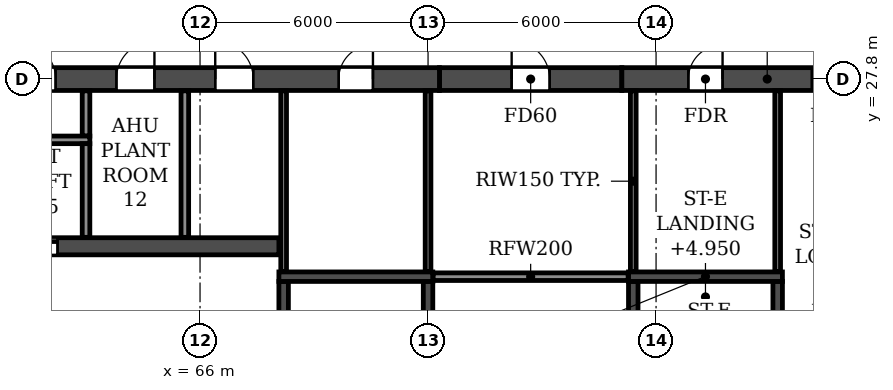
"""IFC4 building model, lengths in metres.
Left out: names, types, materials, properties, quantities, classifications, styles, units other than length and angle.
Written with IfcOpenShell. Run it as: python <this file> out.ifc"""

import sys

from ifc_helpers import new_model, si_unit, direction, frame, frame_2d, origin, place, context, subcontext, project, spatial, rectangle, extrude, element, fill, save


model = new_model("IFC4")
c1 = context("Model", 3, precision=1e-05, world=origin(), true_north=direction((0.0, 1.0)))
c2 = subcontext(c1, "Body", "Model", "MODEL_VIEW")
j1 = project(units=[si_unit("LENGTHUNIT", "METRE"), si_unit("PLANEANGLEUNIT", "RADIAN")], contexts=[c1])
p1 = place(None, origin())
s1 = spatial("IfcSite", under=j1, at=p1, CompositionType="ELEMENT")
p2 = place(p1, origin())
s2 = spatial("IfcBuilding", under=s1, at=p2, CompositionType="ELEMENT")
p3 = place(p2, frame((0.0, 0.0, 165.3)))
s3 = spatial("IfcBuildingStorey", under=s2, at=p3, CompositionType="ELEMENT", Elevation=165.3)
p4 = place(p3, frame((72.3, 27.8, 0.0), z_axis=(0.0, 0.0, 1.0), x_axis=(1.0, 0.0, 0.0)))
e1 = element("IfcWall", 1, at=p4, inside=s3, PredefinedType="SHEAR", context=c2, shape_type="SweptSolid", body=[
    extrude(rectangle(XDim=4.8, YDim=0.6, at=frame_2d((2.4, 0.0))), origin(), (0.0, 0.0, 1.0), 6.38),
])
p5 = place(p4, frame((1.9, 0.0, 0.0)))
e2 = element("IfcOpeningElement", 2, at=p5, cuts=e1, PredefinedType="OPENING", context=c2, shape_type="SweptSolid", body=[
    extrude(rectangle(XDim=1.0, YDim=2.1, at=frame_2d((0.5, 1.05))), frame((0.0, 0.31, 0.0), z_axis=(0.0, -1.0, 0.0), x_axis=(1.0, 0.0, 0.0)), (0.0, 0.0, 1.0), 0.62),
])
p6 = place(p3, frame((29.7, 27.8, 0.0), z_axis=(0.0, 0.0, 1.0), x_axis=(1.0, 0.0, 0.0)))
e3 = element("IfcWall", 3, at=p6, inside=s3, PredefinedType="SOLIDWALL", context=c2, shape_type="SweptSolid", body=[
    extrude(rectangle(XDim=42.6, YDim=0.6, at=frame_2d((21.3, 0.0))), origin(), (0.0, 0.0, 1.0), 6.38),
])
p7 = place(p6, frame((1.75, 0.0, 0.0)))
e4 = element("IfcOpeningElement", 4, at=p7, cuts=e3, PredefinedType="OPENING", context=c2, shape_type="SweptSolid", body=[
    extrude(rectangle(XDim=0.9, YDim=2.1, at=frame_2d((0.45, 1.05))), frame((0.0, 0.31, 0.0), z_axis=(0.0, -1.0, 0.0), x_axis=(1.0, 0.0, 0.0)), (0.0, 0.0, 1.0), 0.62),
])
p8 = place(p6, frame((4.9, 0.0, 0.0)))
e5 = element("IfcOpeningElement", 5, at=p8, cuts=e3, PredefinedType="OPENING", context=c2, shape_type="SweptSolid", body=[
    extrude(rectangle(XDim=1.0, YDim=2.1, at=frame_2d((0.5, 1.05))), frame((0.0, 0.31, 0.0), z_axis=(0.0, -1.0, 0.0), x_axis=(1.0, 0.0, 0.0)), (0.0, 0.0, 1.0), 0.62),
])
p9 = place(p6, frame((10.1, 0.0, 0.0)))
e6 = element("IfcOpeningElement", 6, at=p9, cuts=e3, PredefinedType="OPENING", context=c2, shape_type="SweptSolid", body=[
    extrude(rectangle(XDim=1.0, YDim=2.1, at=frame_2d((0.5, 1.05))), frame((0.0, 0.31, 0.0), z_axis=(0.0, -1.0, 0.0), x_axis=(1.0, 0.0, 0.0)), (0.0, 0.0, 1.0), 0.62),
])
p10 = place(p6, frame((17.9, 0.0, 0.0)))
e7 = element("IfcOpeningElement", 7, at=p10, cuts=e3, PredefinedType="OPENING", context=c2, shape_type="SweptSolid", body=[
    extrude(rectangle(XDim=1.0, YDim=2.1, at=frame_2d((0.5, 1.05))), frame((0.0, 0.31, 0.0), z_axis=(0.0, -1.0, 0.0), x_axis=(1.0, 0.0, 0.0)), (0.0, 0.0, 1.0), 0.62),
])
p11 = place(p6, frame((20.8, 0.0, 0.0)))
e8 = element("IfcOpeningElement", 8, at=p11, cuts=e3, PredefinedType="OPENING", context=c2, shape_type="SweptSolid", body=[
    extrude(rectangle(XDim=1.0, YDim=2.1, at=frame_2d((0.5, 1.05))), frame((0.0, 0.31, 0.0), z_axis=(0.0, -1.0, 0.0), x_axis=(1.0, 0.0, 0.0)), (0.0, 0.0, 1.0), 0.62),
])
p12 = place(p6, frame((23.7, 0.0, 0.0)))
e9 = element("IfcOpeningElement", 9, at=p12, cuts=e3, PredefinedType="OPENING", context=c2, shape_type="SweptSolid", body=[
    extrude(rectangle(XDim=1.0, YDim=2.1, at=frame_2d((0.5, 1.05))), frame((0.0, 0.31, 0.0), z_axis=(0.0, -1.0, 0.0), x_axis=(1.0, 0.0, 0.0)), (0.0, 0.0, 1.0), 0.62),
])
p13 = place(p6, frame((26.3, 0.0, 0.0)))
e10 = element("IfcOpeningElement", 10, at=p13, cuts=e3, PredefinedType="OPENING", context=c2, shape_type="SweptSolid", body=[
    extrude(rectangle(XDim=1.0, YDim=2.1, at=frame_2d((0.5, 1.05))), frame((0.0, 0.31, 0.0), z_axis=(0.0, -1.0, 0.0), x_axis=(1.0, 0.0, 0.0)), (0.0, 0.0, 1.0), 0.62),
])
p14 = place(p6, frame((28.9, 0.0, 0.0)))
e11 = element("IfcOpeningElement", 11, at=p14, cuts=e3, PredefinedType="OPENING", context=c2, shape_type="SweptSolid", body=[
    extrude(rectangle(XDim=1.0, YDim=2.1, at=frame_2d((0.5, 1.05))), frame((0.0, 0.31, 0.0), z_axis=(0.0, -1.0, 0.0), x_axis=(1.0, 0.0, 0.0)), (0.0, 0.0, 1.0), 0.62),
])
p15 = place(p6, frame((31.5, 0.0, 0.0)))
e12 = element("IfcOpeningElement", 12, at=p15, cuts=e3, PredefinedType="OPENING", context=c2, shape_type="SweptSolid", body=[
    extrude(rectangle(XDim=1.0, YDim=2.1, at=frame_2d((0.5, 1.05))), frame((0.0, 0.31, 0.0), z_axis=(0.0, -1.0, 0.0), x_axis=(1.0, 0.0, 0.0)), (0.0, 0.0, 1.0), 0.62),
])
p16 = place(p6, frame((34.1, 0.0, 0.0)))
e13 = element("IfcOpeningElement", 13, at=p16, cuts=e3, PredefinedType="OPENING", context=c2, shape_type="SweptSolid", body=[
    extrude(rectangle(XDim=1.0, YDim=2.1, at=frame_2d((0.5, 1.05))), frame((0.0, 0.31, 0.0), z_axis=(0.0, -1.0, 0.0), x_axis=(1.0, 0.0, 0.0)), (0.0, 0.0, 1.0), 0.62),
])
p17 = place(p6, frame((36.7, 0.0, 0.0)))
e14 = element("IfcOpeningElement", 14, at=p17, cuts=e3, PredefinedType="OPENING", context=c2, shape_type="SweptSolid", body=[
    extrude(rectangle(XDim=1.0, YDim=2.1, at=frame_2d((0.5, 1.05))), frame((0.0, 0.31, 0.0), z_axis=(0.0, -1.0, 0.0), x_axis=(1.0, 0.0, 0.0)), (0.0, 0.0, 1.0), 0.62),
])
p18 = place(p6, frame((39.95, 0.0, 0.0)))
e15 = element("IfcOpeningElement", 15, at=p18, cuts=e3, PredefinedType="OPENING", context=c2, shape_type="SweptSolid", body=[
    extrude(rectangle(XDim=0.9, YDim=2.1, at=frame_2d((0.45, 1.05))), frame((0.0, 0.31, 0.0), z_axis=(0.0, -1.0, 0.0), x_axis=(1.0, 0.0, 0.0)), (0.0, 0.0, 1.0), 0.62),
])
p19 = place(p3, frame((77.1, 27.8, 0.0), z_axis=(0.0, 0.0, 1.0), x_axis=(1.0, 0.0, 0.0)))
e16 = element("IfcWall", 16, at=p19, inside=s3, PredefinedType="SOLIDWALL", context=c2, shape_type="SweptSolid", body=[
    extrude(rectangle(XDim=6.7, YDim=0.6, at=frame_2d((3.35, 0.0))), origin(), (0.0, 0.0, 1.0), 6.38),
])
p20 = place(p19, frame((1.75, 0.0, 0.0)))
e17 = element("IfcOpeningElement", 17, at=p20, cuts=e16, PredefinedType="OPENING", context=c2, shape_type="SweptSolid", body=[
    extrude(rectangle(XDim=0.9, YDim=2.1, at=frame_2d((0.45, 1.05))), frame((0.0, 0.31, 0.0), z_axis=(0.0, -1.0, 0.0), x_axis=(1.0, 0.0, 0.0)), (0.0, 0.0, 1.0), 0.62),
])
p21 = place(p19, frame((5.0, 0.0, 0.0)))
e18 = element("IfcOpeningElement", 18, at=p21, cuts=e16, PredefinedType="OPENING", context=c2, shape_type="SweptSolid", body=[
    extrude(rectangle(XDim=1.0, YDim=2.1, at=frame_2d((0.5, 1.05))), frame((0.0, 0.31, 0.0), z_axis=(0.0, -1.0, 0.0), x_axis=(1.0, 0.0, 0.0)), (0.0, 0.0, 1.0), 0.62),
])
p22 = place(p3, frame((33.925, 23.4, 0.0), z_axis=(0.0, 0.0, 1.0), x_axis=(1.0, 0.0, 0.0)))
e19 = element("IfcWall", 19, at=p22, inside=s3, PredefinedType="SOLIDWALL", context=c2, shape_type="SweptSolid", body=[
    extrude(rectangle(XDim=34.15, YDim=0.45, at=frame_2d((17.075, 0.0))), origin(), (0.0, 0.0, 1.0), 6.38),
])
p23 = place(p22, frame((16.175, 0.0, 0.0)))
e20 = element("IfcOpeningElement", 20, at=p23, cuts=e19, PredefinedType="OPENING", context=c2, shape_type="SweptSolid", body=[
    extrude(rectangle(XDim=1.8, YDim=2.1, at=frame_2d((0.9, 1.05))), frame((0.0, 0.235, 0.0), z_axis=(0.0, -1.0, 0.0), x_axis=(1.0, 0.0, 0.0)), (0.0, 0.0, 1.0), 0.47),
])
p24 = place(p22, frame((0.625, 0.0, 0.0)))
e21 = element("IfcOpeningElement", 21, at=p24, cuts=e19, PredefinedType="OPENING", context=c2, shape_type="SweptSolid", body=[
    extrude(rectangle(XDim=1.1, YDim=2.1, at=frame_2d((0.55, 1.05))), frame((0.0, 0.235, 0.0), z_axis=(0.0, -1.0, 0.0), x_axis=(1.0, 0.0, 0.0)), (0.0, 0.0, 1.0), 0.47),
])
p25 = place(p22, frame((3.225, 0.0, 0.0)))
e22 = element("IfcOpeningElement", 22, at=p25, cuts=e19, PredefinedType="OPENING", context=c2, shape_type="SweptSolid", body=[
    extrude(rectangle(XDim=1.1, YDim=2.1, at=frame_2d((0.55, 1.05))), frame((0.0, 0.235, 0.0), z_axis=(0.0, -1.0, 0.0), x_axis=(1.0, 0.0, 0.0)), (0.0, 0.0, 1.0), 0.47),
])
p26 = place(p22, frame((5.825, 0.0, 0.0)))
e23 = element("IfcOpeningElement", 23, at=p26, cuts=e19, PredefinedType="OPENING", context=c2, shape_type="SweptSolid", body=[
    extrude(rectangle(XDim=1.1, YDim=2.1, at=frame_2d((0.55, 1.05))), frame((0.0, 0.235, 0.0), z_axis=(0.0, -1.0, 0.0), x_axis=(1.0, 0.0, 0.0)), (0.0, 0.0, 1.0), 0.47),
])
p27 = place(p22, frame((8.425, 0.0, 0.0)))
e24 = element("IfcOpeningElement", 24, at=p27, cuts=e19, PredefinedType="OPENING", context=c2, shape_type="SweptSolid", body=[
    extrude(rectangle(XDim=1.1, YDim=2.1, at=frame_2d((0.55, 1.05))), frame((0.0, 0.235, 0.0), z_axis=(0.0, -1.0, 0.0), x_axis=(1.0, 0.0, 0.0)), (0.0, 0.0, 1.0), 0.47),
])
p28 = place(p22, frame((11.025, 0.0, 0.0)))
e25 = element("IfcOpeningElement", 25, at=p28, cuts=e19, PredefinedType="OPENING", context=c2, shape_type="SweptSolid", body=[
    extrude(rectangle(XDim=1.1, YDim=2.1, at=frame_2d((0.55, 1.05))), frame((0.0, 0.235, 0.0), z_axis=(0.0, -1.0, 0.0), x_axis=(1.0, 0.0, 0.0)), (0.0, 0.0, 1.0), 0.47),
])
p29 = place(p22, frame((13.625, 0.0, 0.0)))
e26 = element("IfcOpeningElement", 26, at=p29, cuts=e19, PredefinedType="OPENING", context=c2, shape_type="SweptSolid", body=[
    extrude(rectangle(XDim=1.1, YDim=2.1, at=frame_2d((0.55, 1.05))), frame((0.0, 0.235, 0.0), z_axis=(0.0, -1.0, 0.0), x_axis=(1.0, 0.0, 0.0)), (0.0, 0.0, 1.0), 0.47),
])
p30 = place(p22, frame((27.225, 0.0, 0.0)))
e27 = element("IfcOpeningElement", 27, at=p30, cuts=e19, PredefinedType="OPENING", context=c2, shape_type="SweptSolid", body=[
    extrude(rectangle(XDim=1.1, YDim=2.1, at=frame_2d((0.55, 1.05))), frame((0.0, 0.235, 0.0), z_axis=(0.0, -1.0, 0.0), x_axis=(1.0, 0.0, 0.0)), (0.0, 0.0, 1.0), 0.47),
])
p31 = place(p3, frame((68.2, 14.825, 0.0), z_axis=(0.0, 0.0, 1.0), x_axis=(0.0, 1.0, 0.0)))
e28 = element("IfcWall", 28, at=p31, inside=s3, PredefinedType="SOLIDWALL", context=c2, shape_type="SweptSolid", body=[
    extrude(rectangle(XDim=7.65, YDim=0.25, at=frame_2d((3.825, 0.0))), origin(), (0.0, 0.0, 1.0), 6.38),
])
p32 = place(p31, frame((0.475, 0.0, 0.0)))
e29 = element("IfcOpeningElement", 29, at=p32, cuts=e28, PredefinedType="OPENING", context=c2, shape_type="SweptSolid", body=[
    extrude(rectangle(XDim=1.0, YDim=2.1, at=frame_2d((0.5, 1.05))), frame((0.0, 0.135, 0.0), z_axis=(0.0, -1.0, 0.0), x_axis=(1.0, 0.0, 0.0)), (0.0, 0.0, 1.0), 0.27),
])
p33 = place(p3, frame((72.0, 14.825, 0.0), z_axis=(0.0, 0.0, 1.0), x_axis=(0.0, 1.0, 0.0)))
e30 = element("IfcWall", 30, at=p33, inside=s3, PredefinedType="SOLIDWALL", context=c2, shape_type="SweptSolid", body=[
    extrude(rectangle(XDim=7.65, YDim=0.25, at=frame_2d((3.825, 0.0))), origin(), (0.0, 0.0, 1.0), 6.38),
])
p34 = place(p3, frame((68.075, 22.6, 0.0), z_axis=(0.0, 0.0, 1.0), x_axis=(1.0, 0.0, 0.0)))
e31 = element("IfcWall", 31, at=p34, inside=s3, PredefinedType="SOLIDWALL", context=c2, shape_type="SweptSolid", body=[
    extrude(rectangle(XDim=4.05, YDim=0.25, at=frame_2d((2.025, 0.0))), origin(), (0.0, 0.0, 1.0), 6.38),
])
p35 = place(p3, frame((77.4, 14.825, 0.0), z_axis=(0.0, 0.0, 1.0), x_axis=(0.0, 1.0, 0.0)))
e32 = element("IfcWall", 32, at=p35, inside=s3, PredefinedType="SOLIDWALL", context=c2, shape_type="SweptSolid", body=[
    extrude(rectangle(XDim=7.65, YDim=0.25, at=frame_2d((3.825, 0.0))), origin(), (0.0, 0.0, 1.0), 6.38),
])
p36 = place(p35, frame((0.475, 0.0, 0.0)))
e33 = element("IfcOpeningElement", 33, at=p36, cuts=e32, PredefinedType="OPENING", context=c2, shape_type="SweptSolid", body=[
    extrude(rectangle(XDim=1.0, YDim=2.1, at=frame_2d((0.5, 1.05))), frame((0.0, 0.135, 0.0), z_axis=(0.0, -1.0, 0.0), x_axis=(1.0, 0.0, 0.0)), (0.0, 0.0, 1.0), 0.27),
])
p37 = place(p3, frame((81.2, 14.825, 0.0), z_axis=(0.0, 0.0, 1.0), x_axis=(0.0, 1.0, 0.0)))
e34 = element("IfcWall", 34, at=p37, inside=s3, PredefinedType="SOLIDWALL", context=c2, shape_type="SweptSolid", body=[
    extrude(rectangle(XDim=7.65, YDim=0.25, at=frame_2d((3.825, 0.0))), origin(), (0.0, 0.0, 1.0), 6.38),
])
p38 = place(p37, frame((0.475, 0.0, 0.0)))
e35 = element("IfcOpeningElement", 35, at=p38, cuts=e34, PredefinedType="OPENING", context=c2, shape_type="SweptSolid", body=[
    extrude(rectangle(XDim=1.0, YDim=2.1, at=frame_2d((0.5, 1.05))), frame((0.0, 0.135, 0.0), z_axis=(0.0, -1.0, 0.0), x_axis=(1.0, 0.0, 0.0)), (0.0, 0.0, 1.0), 0.27),
])
p39 = place(p3, frame((77.275, 22.6, 0.0), z_axis=(0.0, 0.0, 1.0), x_axis=(1.0, 0.0, 0.0)))
e36 = element("IfcWall", 36, at=p39, inside=s3, PredefinedType="SOLIDWALL", context=c2, shape_type="SweptSolid", body=[
    extrude(rectangle(XDim=4.05, YDim=0.25, at=frame_2d((2.025, 0.0))), origin(), (0.0, 0.0, 1.0), 6.38),
])
p40 = place(p3, frame((63.0, 26.3, 0.0), z_axis=(0.0, 0.0, 1.0), x_axis=(0.0, 1.0, 0.0)))
e37 = element("IfcWall", 37, at=p40, inside=s3, PredefinedType="PARTITIONING", context=c2, shape_type="SweptSolid", body=[
    extrude(rectangle(XDim=1.19, YDim=0.2, at=frame_2d((0.595, 0.0))), origin(), (0.0, 0.0, 1.0), 6.38),
])
p41 = place(p3, frame((65.6, 23.635, 0.0), z_axis=(0.0, 0.0, 1.0), x_axis=(0.0, 1.0, 0.0)))
e38 = element("IfcWall", 38, at=p41, inside=s3, PredefinedType="PARTITIONING", context=c2, shape_type="SweptSolid", body=[
    extrude(rectangle(XDim=3.855, YDim=0.2, at=frame_2d((1.927, 0.0))), origin(), (0.0, 0.0, 1.0), 6.38),
])
p42 = place(p3, frame((72.135, 22.6, 0.0), z_axis=(0.0, 0.0, 1.0), x_axis=(1.0, 0.0, 0.0)))
e39 = element("IfcWall", 39, at=p42, inside=s3, PredefinedType="PARTITIONING", context=c2, shape_type="SweptSolid", body=[
    extrude(rectangle(XDim=5.13, YDim=0.2, at=frame_2d((2.565, 0.0))), origin(), (0.0, 0.0, 1.0), 6.38),
])
for number, where, z_axis, x_axis in (
    (40, (68.2, 22.735, 0.0), (0.0, 0.0, 1.0), (0.0, 1.0, 0.0)),
    (41, (72.0, 22.735, 0.0), (0.0, 0.0, 1.0), (0.0, 1.0, 0.0)),
    (42, (77.4, 22.735, 0.0), (0.0, 0.0, 1.0), (0.0, 1.0, 0.0)),
    (43, (81.2, 22.735, 0.0), (0.0, 0.0, 1.0), (0.0, 1.0, 0.0)),
):
    element("IfcWall", number, at=place(p3, frame(where, z_axis=z_axis, x_axis=x_axis)), inside=s3, PredefinedType="PARTITIONING", context=c2, shape_type="SweptSolid", body=[
        extrude(rectangle(XDim=4.755, YDim=0.15, at=frame_2d((2.377, 0.0))), origin(), (0.0, 0.0, 1.0), 6.38),
    ])
p43 = place(p3, frame((57.7, 26.2, 0.0), z_axis=(0.0, 0.0, 1.0), x_axis=(1.0, 0.0, 0.0)))
e44 = element("IfcWall", 44, at=p43, inside=s3, PredefinedType="PARTITIONING", context=c2, shape_type="SweptSolid", body=[
    extrude(rectangle(XDim=5.4, YDim=0.2, at=frame_2d((2.7, 0.0))), origin(), (0.0, 0.0, 1.0), 6.38),
])
p44 = place(p3, frame((63.0, 23.635, 0.0), z_axis=(0.0, 0.0, 1.0), x_axis=(0.0, 1.0, 0.0)))
e45 = element("IfcWall", 45, at=p44, inside=s3, PredefinedType="PARTITIONING", context=c2, shape_type="SweptSolid", body=[
    extrude(rectangle(XDim=2.465, YDim=0.2, at=frame_2d((1.232, 0.0))), origin(), (0.0, 0.0, 1.0), 6.38),
])
p45 = place(p15, origin())
e46 = element("IfcDoor", 46, at=p45, inside=s3, OperationType="SINGLE_SWING_LEFT", PredefinedType="DOOR", context=c2, shape_type="SweptSolid", body=[
    extrude(rectangle(XDim=1.0, YDim=2.1, at=frame_2d((0.5, 1.05))), frame((0.0, 0.025, 0.0), z_axis=(0.0, -1.0, 0.0), x_axis=(1.0, 0.0, 0.0)), (0.0, 0.0, 1.0), 0.05),
])
fill(e12, e46)
p46 = place(p16, origin())
e47 = element("IfcDoor", 47, at=p46, inside=s3, OperationType="SINGLE_SWING_RIGHT", PredefinedType="DOOR", context=c2, shape_type="SweptSolid", body=[
    extrude(rectangle(XDim=1.0, YDim=2.1, at=frame_2d((0.5, 1.05))), frame((0.0, 0.025, 0.0), z_axis=(0.0, -1.0, 0.0), x_axis=(1.0, 0.0, 0.0)), (0.0, 0.0, 1.0), 0.05),
])
fill(e13, e47)
p47 = place(p17, origin())
e48 = element("IfcDoor", 48, at=p47, inside=s3, OperationType="SINGLE_SWING_LEFT", PredefinedType="DOOR", context=c2, shape_type="SweptSolid", body=[
    extrude(rectangle(XDim=1.0, YDim=2.1, at=frame_2d((0.5, 1.05))), frame((0.0, 0.025, 0.0), z_axis=(0.0, -1.0, 0.0), x_axis=(1.0, 0.0, 0.0)), (0.0, 0.0, 1.0), 0.05),
])
fill(e14, e48)
p48 = place(p18, origin())
e49 = element("IfcDoor", 49, at=p48, inside=s3, OperationType="SINGLE_SWING_RIGHT", PredefinedType="DOOR", context=c2, shape_type="SweptSolid", body=[
    extrude(rectangle(XDim=0.9, YDim=2.1, at=frame_2d((0.45, 1.05))), frame((0.0, 0.025, 0.0), z_axis=(0.0, -1.0, 0.0), x_axis=(1.0, 0.0, 0.0)), (0.0, 0.0, 1.0), 0.05),
])
fill(e15, e49)
p49 = place(p5, origin())
e50 = element("IfcDoor", 50, at=p49, inside=s3, OperationType="SINGLE_SWING_LEFT", PredefinedType="DOOR", context=c2, shape_type="SweptSolid", body=[
    extrude(rectangle(XDim=1.0, YDim=2.1, at=frame_2d((0.5, 1.05))), frame((0.0, 0.025, 0.0), z_axis=(0.0, -1.0, 0.0), x_axis=(1.0, 0.0, 0.0)), (0.0, 0.0, 1.0), 0.05),
])
fill(e2, e50)
p50 = place(p20, origin())
e51 = element("IfcDoor", 51, at=p50, inside=s3, OperationType="SINGLE_SWING_RIGHT", PredefinedType="DOOR", context=c2, shape_type="SweptSolid", body=[
    extrude(rectangle(XDim=0.9, YDim=2.1, at=frame_2d((0.45, 1.05))), frame((0.0, 0.025, 0.0), z_axis=(0.0, -1.0, 0.0), x_axis=(1.0, 0.0, 0.0)), (0.0, 0.0, 1.0), 0.05),
])
fill(e17, e51)
p51 = place(p21, origin())
e52 = element("IfcDoor", 52, at=p51, inside=s3, OperationType="SINGLE_SWING_RIGHT", PredefinedType="DOOR", context=c2, shape_type="SweptSolid", body=[
    extrude(rectangle(XDim=1.0, YDim=2.1, at=frame_2d((0.5, 1.05))), frame((0.0, 0.025, 0.0), z_axis=(0.0, -1.0, 0.0), x_axis=(1.0, 0.0, 0.0)), (0.0, 0.0, 1.0), 0.05),
])
fill(e18, e52)
p52 = place(p30, origin())
e53 = element("IfcDoor", 53, at=p52, inside=s3, OperationType="DOUBLE_DOOR_SLIDING", PredefinedType="DOOR", context=c2, shape_type="SweptSolid", body=[
    extrude(rectangle(XDim=1.1, YDim=2.1, at=frame_2d((0.55, 1.05))), frame((0.0, 0.025, 0.0), z_axis=(0.0, -1.0, 0.0), x_axis=(1.0, 0.0, 0.0)), (0.0, 0.0, 1.0), 0.05),
])
fill(e27, e53)
save(model, sys.argv[1])
